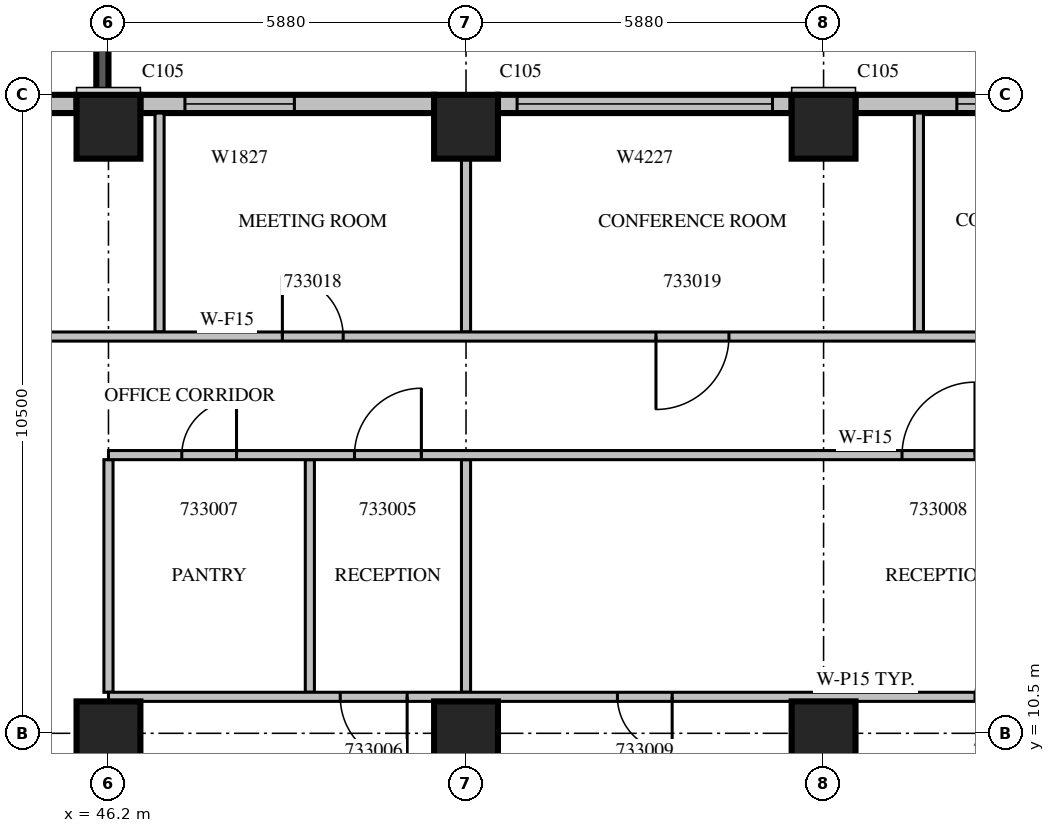
"""IFC4 building model, lengths in metres.
Left out: names, types, materials, properties, quantities, classifications, styles, units other than length and angle.
Written with IfcOpenShell. Run it as: python <this file> out.ifc"""

import sys

from ifc_helpers import new_model, si_unit, direction, frame, frame_2d, origin, origin_2d, place, context, subcontext, project, spatial, rectangle, extrude, source, transform, mapped, element, fill, save


model = new_model("IFC4")
c1 = context("Model", 3, precision=1e-05, world=origin(), true_north=direction((0.0, 1.0)))
c2 = subcontext(c1, "Body", "Model", "MODEL_VIEW")
j1 = project(units=[si_unit("LENGTHUNIT", "METRE"), si_unit("PLANEANGLEUNIT", "RADIAN")], contexts=[c1])
p1 = place(None, origin())
s1 = spatial("IfcSite", under=j1, at=p1, CompositionType="ELEMENT")
p2 = place(p1, origin())
s2 = spatial("IfcBuilding", under=s1, at=p2, CompositionType="ELEMENT")
p3 = place(p2, frame((0.0, 0.0, 149.7)))
s3 = spatial("IfcBuildingStorey", under=s2, at=p3, CompositionType="ELEMENT", Elevation=149.7)
m1 = source(origin(), c2, "Body", "SweptSolid", [
    extrude(rectangle(XDim=1.05, YDim=1.05, at=origin_2d()), origin(), (0.0, 0.0, 1.0), 4.2),
])
for number, where, z_axis, x_axis in (
    (1, (46.2, 10.5, 0.0), (0.0, 0.0, 1.0), (1.0, 0.0, 0.0)),
    (2, (52.08, 10.5, 0.0), (0.0, 0.0, 1.0), (1.0, 0.0, 0.0)),
    (3, (57.96, 10.5, 0.0), (0.0, 0.0, 1.0), (1.0, 0.0, 0.0)),
    (4, (46.2, 20.475, 0.0), (0.0, 0.0, 1.0), (1.0, 0.0, 0.0)),
    (5, (52.08, 20.475, 0.0), (0.0, 0.0, 1.0), (1.0, 0.0, 0.0)),
    (6, (57.96, 20.475, 0.0), (0.0, 0.0, 1.0), (1.0, 0.0, 0.0)),
):
    element("IfcColumn", number, at=place(p3, frame(where, z_axis=z_axis, x_axis=x_axis)), inside=s3, PredefinedType="COLUMN", context=c2, shape_type="MappedRepresentation", body=[
        mapped(m1, transform((0.0, 0.0, 0.0), scale=1.0)),
    ])
m2 = source(origin(), c2, "Body", "SweptSolid", [
    extrude(rectangle(XDim=4.83, YDim=0.3, at=frame_2d((2.415, 0.0))), origin(), (0.0, 0.0, 1.0), 3.8),
])
p4 = place(p3, frame((63.315, 20.85, 0.0), z_axis=(0.0, 0.0, 1.0), x_axis=(-1.0, 0.0, 0.0)))
e7 = element("IfcWall", 7, at=p4, inside=s3, PredefinedType="STANDARD", context=c2, shape_type="MappedRepresentation", body=[
    mapped(m2, transform((0.0, 0.0, 0.0), scale=1.0)),
])
m3 = source(origin(), c2, "Body", "SweptSolid", [
    extrude(rectangle(XDim=1.8, YDim=2.7, at=frame_2d((0.9, 1.35))), frame((0.0, 0.16, 0.0), z_axis=(0.0, -1.0, 0.0), x_axis=(1.0, 0.0, 0.0)), (0.0, 0.0, 1.0), 0.32),
])
p5 = place(p4, frame((1.363, 0.0, 0.6)))
e8 = element("IfcOpeningElement", 8, at=p5, cuts=e7, PredefinedType="OPENING", context=c2, shape_type="MappedRepresentation", body=[
    mapped(m3, transform((0.0, 0.0, 0.0), scale=1.0)),
])
p6 = place(p3, frame((57.435, 20.85, 0.0), z_axis=(0.0, 0.0, 1.0), x_axis=(-1.0, 0.0, 0.0)))
e9 = element("IfcWall", 9, at=p6, inside=s3, PredefinedType="STANDARD", context=c2, shape_type="MappedRepresentation", body=[
    mapped(m2, transform((0.0, 0.0, 0.0), scale=1.0)),
])
m4 = source(origin(), c2, "Body", "SweptSolid", [
    extrude(rectangle(XDim=4.2, YDim=2.7, at=frame_2d((2.1, 1.35))), frame((0.0, 0.16, 0.0), z_axis=(0.0, -1.0, 0.0), x_axis=(1.0, 0.0, 0.0)), (0.0, 0.0, 1.0), 0.32),
])
p7 = place(p6, frame((0.315, 0.0, 0.6)))
e10 = element("IfcOpeningElement", 10, at=p7, cuts=e9, PredefinedType="OPENING", context=c2, shape_type="MappedRepresentation", body=[
    mapped(m4, transform((0.0, 0.0, 0.0), scale=1.0)),
])
p8 = place(p3, frame((51.555, 20.85, 0.0), z_axis=(0.0, 0.0, 1.0), x_axis=(-1.0, 0.0, 0.0)))
e11 = element("IfcWall", 11, at=p8, inside=s3, PredefinedType="STANDARD", context=c2, shape_type="MappedRepresentation", body=[
    mapped(m2, transform((0.0, 0.0, 0.0), scale=1.0)),
])
p9 = place(p8, frame((2.297, 0.0, 0.6)))
e12 = element("IfcOpeningElement", 12, at=p9, cuts=e11, PredefinedType="OPENING", context=c2, shape_type="MappedRepresentation", body=[
    mapped(m3, transform((0.0, 0.0, 0.0), scale=1.0)),
])
m5 = source(origin(), c2, "Body", "SweptSolid", [
    extrude(rectangle(XDim=7.35, YDim=0.3, at=frame_2d((3.675, 0.0))), origin(), (0.0, 0.0, 1.0), 3.8),
])
p10 = place(p3, frame((45.675, 20.85, 0.0), z_axis=(0.0, 0.0, 1.0), x_axis=(-1.0, 0.0, 0.0)))
e13 = element("IfcWall", 13, at=p10, inside=s3, PredefinedType="STANDARD", context=c2, shape_type="MappedRepresentation", body=[
    mapped(m5, transform((0.0, 0.0, 0.0), scale=1.0)),
])
m6 = source(origin(), c2, "Body", "SweptSolid", [
    extrude(rectangle(XDim=1.0, YDim=2.1, at=frame_2d((0.5, 1.05))), frame((0.0, 0.16, 0.0), z_axis=(0.0, -1.0, 0.0), x_axis=(1.0, 0.0, 0.0)), (0.0, 0.0, 1.0), 0.32),
])
p11 = place(p10, frame((1.075, 0.0, 0.0)))
e14 = element("IfcOpeningElement", 14, at=p11, cuts=e13, PredefinedType="OPENING", context=c2, shape_type="MappedRepresentation", body=[
    mapped(m6, transform((0.0, 0.0, 0.0), scale=1.0)),
])
m7 = source(origin(), c2, "Body", "SweptSolid", [
    extrude(rectangle(XDim=3.9, YDim=0.2, at=frame_2d((1.95, 0.0))), origin(), (0.0, 0.0, 1.0), 3.79),
])
p12 = place(p3, frame((46.1, 21.0, 0.0), z_axis=(0.0, 0.0, 1.0), x_axis=(0.0, 1.0, 0.0)))
e15 = element("IfcWall", 15, at=p12, inside=s3, PredefinedType="SOLIDWALL", context=c2, shape_type="MappedRepresentation", body=[
    mapped(m7, transform((0.0, 0.0, 0.0), scale=1.0)),
])
m8 = source(origin(), c2, "Body", "SweptSolid", [
    extrude(rectangle(XDim=2.4, YDim=2.7, at=frame_2d((1.2, 1.35))), frame((0.0, 0.11, 0.0), z_axis=(0.0, -1.0, 0.0), x_axis=(1.0, 0.0, 0.0)), (0.0, 0.0, 1.0), 0.22),
])
p13 = place(p12, frame((0.75, 0.0, 0.6)))
e16 = element("IfcOpeningElement", 16, at=p13, cuts=e15, PredefinedType="OPENING", context=c2, shape_type="MappedRepresentation", body=[
    mapped(m8, transform((0.0, 0.0, 0.0), scale=1.0)),
])
m9 = source(origin(), c2, "Body", "SweptSolid", [
    extrude(rectangle(XDim=3.825, YDim=0.15, at=frame_2d((1.913, 0.0))), origin(), (0.0, 0.0, 1.0), 3.8),
])
for number, where, z_axis, x_axis in (
    (17, (49.512, 11.175, 0.0), (0.0, 0.0, 1.0), (0.0, 1.0, 0.0)),
    (18, (46.2, 11.175, 0.0), (0.0, 0.0, 1.0), (0.0, 1.0, 0.0)),
    (19, (52.08, 11.175, 0.0), (0.0, 0.0, 1.0), (0.0, 1.0, 0.0)),
):
    element("IfcWall", number, at=place(p3, frame(where, z_axis=z_axis, x_axis=x_axis)), inside=s3, PredefinedType="PARTITIONING", context=c2, shape_type="MappedRepresentation", body=[
        mapped(m9, transform((0.0, 0.0, 0.0), scale=1.0)),
    ])
m10 = source(origin(), c2, "Body", "SweptSolid", [
    extrude(rectangle(XDim=24.9, YDim=0.15, at=frame_2d((12.45, 0.0))), origin(), (0.0, 0.0, 1.0), 3.8),
])
p14 = place(p3, frame((71.1, 11.1, 0.0), z_axis=(0.0, 0.0, 1.0), x_axis=(-1.0, 0.0, 0.0)))
e20 = element("IfcWall", 20, at=p14, inside=s3, PredefinedType="PARTITIONING", context=c2, shape_type="MappedRepresentation", body=[
    mapped(m10, transform((0.0, 0.0, 0.0), scale=1.0)),
])
m11 = source(origin(), c2, "Body", "SweptSolid", [
    extrude(rectangle(XDim=1.1, YDim=2.1, at=frame_2d((0.55, 1.05))), frame((0.0, 0.085, 0.0), z_axis=(0.0, -1.0, 0.0), x_axis=(1.0, 0.0, 0.0)), (0.0, 0.0, 1.0), 0.17),
])
p15 = place(p14, frame((19.988, 0.0, 0.0)))
e21 = element("IfcOpeningElement", 21, at=p15, cuts=e20, PredefinedType="OPENING", context=c2, shape_type="MappedRepresentation", body=[
    mapped(m11, transform((0.0, 0.0, 0.0), scale=1.0)),
])
m12 = source(origin(), c2, "Body", "SweptSolid", [
    extrude(rectangle(XDim=0.9, YDim=2.1, at=frame_2d((0.45, 1.05))), frame((0.0, 0.085, 0.0), z_axis=(0.0, -1.0, 0.0), x_axis=(1.0, 0.0, 0.0)), (0.0, 0.0, 1.0), 0.17),
])
p16 = place(p14, frame((15.63, 0.0, 0.0)))
e22 = element("IfcOpeningElement", 22, at=p16, cuts=e20, PredefinedType="OPENING", context=c2, shape_type="MappedRepresentation", body=[
    mapped(m12, transform((0.0, 0.0, 0.0), scale=1.0)),
])
p17 = place(p14, frame((9.75, 0.0, 0.0)))
e23 = element("IfcOpeningElement", 23, at=p17, cuts=e20, PredefinedType="OPENING", context=c2, shape_type="MappedRepresentation", body=[
    mapped(m12, transform((0.0, 0.0, 0.0), scale=1.0)),
])
p18 = place(p14, frame((2.205, 0.0, 0.0)))
e24 = element("IfcOpeningElement", 24, at=p18, cuts=e20, PredefinedType="OPENING", context=c2, shape_type="MappedRepresentation", body=[
    mapped(m12, transform((0.0, 0.0, 0.0), scale=1.0)),
])
m13 = source(origin(), c2, "Body", "SweptSolid", [
    extrude(rectangle(XDim=3.6, YDim=0.15, at=frame_2d((1.8, 0.0))), origin(), (0.0, 0.0, 1.0), 3.8),
])
for number, where, z_axis, x_axis in (
    (25, (47.04, 20.7, 0.0), (0.0, 0.0, 1.0), (0.0, -1.0, 0.0)),
    (26, (59.528, 20.7, 0.0), (0.0, 0.0, 1.0), (0.0, -1.0, 0.0)),
):
    element("IfcWall", number, at=place(p3, frame(where, z_axis=z_axis, x_axis=x_axis)), inside=s3, PredefinedType="PARTITIONING", context=c2, shape_type="MappedRepresentation", body=[
        mapped(m13, transform((0.0, 0.0, 0.0), scale=1.0)),
    ])
m14 = source(origin(), c2, "Body", "SweptSolid", [
    extrude(rectangle(XDim=2.851, YDim=0.15, at=frame_2d((1.425, 0.0))), origin(), (0.0, 0.0, 1.0), 3.8),
])
p19 = place(p3, frame((52.08, 17.1, 0.0), z_axis=(0.0, 0.0, 1.0), x_axis=(0.0, 1.0, 0.0)))
e27 = element("IfcWall", 27, at=p19, inside=s3, PredefinedType="PARTITIONING", context=c2, shape_type="MappedRepresentation", body=[
    mapped(m14, transform((0.0, 0.0, 0.0), scale=1.0)),
])
p20 = place(p3, frame((71.1, 15.075, 0.0), z_axis=(0.0, 0.0, 1.0), x_axis=(-1.0, 0.0, 0.0)))
e28 = element("IfcWall", 28, at=p20, inside=s3, PredefinedType="PARTITIONING", context=c2, shape_type="MappedRepresentation", body=[
    mapped(m10, transform((0.0, 0.0, 0.0), scale=1.0)),
])
p21 = place(p20, frame((19.754, 0.0, 0.0)))
e29 = element("IfcOpeningElement", 29, at=p21, cuts=e28, PredefinedType="OPENING", context=c2, shape_type="MappedRepresentation", body=[
    mapped(m11, transform((0.0, 0.0, 0.0), scale=1.0)),
])
p22 = place(p20, frame((22.794, 0.0, 0.0)))
e30 = element("IfcOpeningElement", 30, at=p22, cuts=e28, PredefinedType="OPENING", context=c2, shape_type="MappedRepresentation", body=[
    mapped(m12, transform((0.0, 0.0, 0.0), scale=1.0)),
])
m15 = source(origin(), c2, "Body", "SweptSolid", [
    extrude(rectangle(XDim=1.2, YDim=2.1, at=frame_2d((0.6, 1.05))), frame((0.0, 0.085, 0.0), z_axis=(0.0, -1.0, 0.0), x_axis=(1.0, 0.0, 0.0)), (0.0, 0.0, 1.0), 0.17),
])
p23 = place(p20, frame((10.65, 0.0, 0.0)))
e31 = element("IfcOpeningElement", 31, at=p23, cuts=e28, PredefinedType="OPENING", context=c2, shape_type="MappedRepresentation", body=[
    mapped(m15, transform((0.0, 0.0, 0.0), scale=1.0)),
])
p24 = place(p20, frame((1.103, 0.0, 0.0)))
e32 = element("IfcOpeningElement", 32, at=p24, cuts=e28, PredefinedType="OPENING", context=c2, shape_type="MappedRepresentation", body=[
    mapped(m15, transform((0.0, 0.0, 0.0), scale=1.0)),
])
m16 = source(origin(), c2, "Body", "SweptSolid", [
    extrude(rectangle(XDim=37.5, YDim=0.15, at=frame_2d((18.75, 0.0))), origin(), (0.0, 0.0, 1.0), 3.8),
])
p25 = place(p3, frame((29.4, 17.025, 0.0), z_axis=(0.0, 0.0, 1.0), x_axis=(1.0, 0.0, 0.0)))
e33 = element("IfcWall", 33, at=p25, inside=s3, PredefinedType="PARTITIONING", context=c2, shape_type="MappedRepresentation", body=[
    mapped(m16, transform((0.0, 0.0, 0.0), scale=1.0)),
])
m17 = source(origin(), c2, "Body", "SweptSolid", [
    extrude(rectangle(XDim=1.0, YDim=2.1, at=frame_2d((0.5, 1.05))), frame((0.0, 0.085, 0.0), z_axis=(0.0, -1.0, 0.0), x_axis=(1.0, 0.0, 0.0)), (0.0, 0.0, 1.0), 0.17),
])
p26 = place(p25, frame((1.357, 0.0, 0.0)))
e34 = element("IfcOpeningElement", 34, at=p26, cuts=e33, PredefinedType="OPENING", context=c2, shape_type="MappedRepresentation", body=[
    mapped(m17, transform((0.0, 0.0, 0.0), scale=1.0)),
])
p27 = place(p25, frame((4.669, 0.0, 0.0)))
e35 = element("IfcOpeningElement", 35, at=p27, cuts=e33, PredefinedType="OPENING", context=c2, shape_type="MappedRepresentation", body=[
    mapped(m17, transform((0.0, 0.0, 0.0), scale=1.0)),
])
p28 = place(p25, frame((7.012, 0.0, 0.0)))
e36 = element("IfcOpeningElement", 36, at=p28, cuts=e33, PredefinedType="OPENING", context=c2, shape_type="MappedRepresentation", body=[
    mapped(m17, transform((0.0, 0.0, 0.0), scale=1.0)),
])
p29 = place(p25, frame((10.05, 0.0, 0.0)))
e37 = element("IfcOpeningElement", 37, at=p29, cuts=e33, PredefinedType="OPENING", context=c2, shape_type="MappedRepresentation", body=[
    mapped(m12, transform((0.0, 0.0, 0.0), scale=1.0)),
])
p30 = place(p25, frame((14.62, 0.0, 0.0)))
e38 = element("IfcOpeningElement", 38, at=p30, cuts=e33, PredefinedType="OPENING", context=c2, shape_type="MappedRepresentation", body=[
    mapped(m17, transform((0.0, 0.0, 0.0), scale=1.0)),
])
p31 = place(p25, frame((19.66, 0.0, 0.0)))
e39 = element("IfcOpeningElement", 39, at=p31, cuts=e33, PredefinedType="OPENING", context=c2, shape_type="MappedRepresentation", body=[
    mapped(m17, transform((0.0, 0.0, 0.0), scale=1.0)),
])
p32 = place(p25, frame((25.804, 0.0, 0.0)))
e40 = element("IfcOpeningElement", 40, at=p32, cuts=e33, PredefinedType="OPENING", context=c2, shape_type="MappedRepresentation", body=[
    mapped(m15, transform((0.0, 0.0, 0.0), scale=1.0)),
])
p33 = place(p25, frame((33.251, 0.0, 0.0)))
e41 = element("IfcOpeningElement", 41, at=p33, cuts=e33, PredefinedType="OPENING", context=c2, shape_type="MappedRepresentation", body=[
    mapped(m15, transform((0.0, 0.0, 0.0), scale=1.0)),
])
m18 = source(origin(), c2, "Body", "SweptSolid", [
    extrude(rectangle(XDim=1.8, YDim=2.7, at=frame_2d((0.9, 1.35))), frame((0.0, 0.03, 0.0), z_axis=(0.0, -1.0, 0.0), x_axis=(1.0, 0.0, 0.0)), (0.0, 0.0, 1.0), 0.06),
])
p34 = place(p5, origin())
e42 = element("IfcWindow", 42, at=p34, inside=s3, PartitioningType="SINGLE_PANEL", PredefinedType="WINDOW", context=c2, shape_type="MappedRepresentation", body=[
    mapped(m18, transform((0.0, 0.0, 0.0), scale=1.0)),
])
fill(e8, e42)
p35 = place(p9, origin())
e43 = element("IfcWindow", 43, at=p35, inside=s3, PartitioningType="SINGLE_PANEL", PredefinedType="WINDOW", context=c2, shape_type="MappedRepresentation", body=[
    mapped(m18, transform((0.0, 0.0, 0.0), scale=1.0)),
])
fill(e12, e43)
m19 = source(origin(), c2, "Body", "SweptSolid", [
    extrude(rectangle(XDim=4.2, YDim=2.7, at=frame_2d((2.1, 1.35))), frame((0.0, 0.03, 0.0), z_axis=(0.0, -1.0, 0.0), x_axis=(1.0, 0.0, 0.0)), (0.0, 0.0, 1.0), 0.06),
])
p36 = place(p7, origin())
e44 = element("IfcWindow", 44, at=p36, inside=s3, PartitioningType="SINGLE_PANEL", PredefinedType="WINDOW", context=c2, shape_type="MappedRepresentation", body=[
    mapped(m19, transform((0.0, 0.0, 0.0), scale=1.0)),
])
fill(e10, e44)
m20 = source(origin(), c2, "Body", "SweptSolid", [
    extrude(rectangle(XDim=1.1, YDim=2.1, at=frame_2d((0.55, 1.05))), frame((0.0, 0.025, 0.0), z_axis=(0.0, -1.0, 0.0), x_axis=(1.0, 0.0, 0.0)), (0.0, 0.0, 1.0), 0.05),
])
p37 = place(p21, origin())
e45 = element("IfcDoor", 45, at=p37, inside=s3, OperationType="SINGLE_SWING_RIGHT", PredefinedType="DOOR", context=c2, shape_type="MappedRepresentation", body=[
    mapped(m20, transform((0.0, 0.0, 0.0), scale=1.0)),
])
fill(e29, e45)
p38 = place(p15, origin())
e46 = element("IfcDoor", 46, at=p38, inside=s3, OperationType="SINGLE_SWING_LEFT", PredefinedType="DOOR", context=c2, shape_type="MappedRepresentation", body=[
    mapped(m20, transform((0.0, 0.0, 0.0), scale=1.0)),
])
fill(e21, e46)
m21 = source(origin(), c2, "Body", "SweptSolid", [
    extrude(rectangle(XDim=0.9, YDim=2.1, at=frame_2d((0.45, 1.05))), frame((0.0, 0.025, 0.0), z_axis=(0.0, -1.0, 0.0), x_axis=(1.0, 0.0, 0.0)), (0.0, 0.0, 1.0), 0.05),
])
p39 = place(p22, origin())
e47 = element("IfcDoor", 47, at=p39, inside=s3, OperationType="SINGLE_SWING_RIGHT", PredefinedType="DOOR", context=c2, shape_type="MappedRepresentation", body=[
    mapped(m21, transform((0.0, 0.0, 0.0), scale=1.0)),
])
fill(e30, e47)
m22 = source(origin(), c2, "Body", "SweptSolid", [
    extrude(rectangle(XDim=1.2, YDim=2.1, at=frame_2d((0.6, 1.05))), frame((0.0, 0.025, 0.0), z_axis=(0.0, -1.0, 0.0), x_axis=(1.0, 0.0, 0.0)), (0.0, 0.0, 1.0), 0.05),
])
p40 = place(p23, origin())
e48 = element("IfcDoor", 48, at=p40, inside=s3, OperationType="SINGLE_SWING_RIGHT", PredefinedType="DOOR", context=c2, shape_type="MappedRepresentation", body=[
    mapped(m22, transform((0.0, 0.0, 0.0), scale=1.0)),
])
fill(e31, e48)
p41 = place(p16, origin())
e49 = element("IfcDoor", 49, at=p41, inside=s3, OperationType="SINGLE_SWING_LEFT", PredefinedType="DOOR", context=c2, shape_type="MappedRepresentation", body=[
    mapped(m21, transform((0.0, 0.0, 0.0), scale=1.0)),
])
fill(e22, e49)
p42 = place(p17, origin())
e50 = element("IfcDoor", 50, at=p42, inside=s3, OperationType="SINGLE_SWING_RIGHT", PredefinedType="DOOR", context=c2, shape_type="MappedRepresentation", body=[
    mapped(m21, transform((0.0, 0.0, 0.0), scale=1.0)),
])
fill(e23, e50)
m23 = source(origin(), c2, "Body", "SweptSolid", [
    extrude(rectangle(XDim=1.0, YDim=2.1, at=frame_2d((0.5, 1.05))), frame((0.0, 0.025, 0.0), z_axis=(0.0, -1.0, 0.0), x_axis=(1.0, 0.0, 0.0)), (0.0, 0.0, 1.0), 0.05),
])
p43 = place(p31, origin())
e51 = element("IfcDoor", 51, at=p43, inside=s3, OperationType="SINGLE_SWING_LEFT", PredefinedType="DOOR", context=c2, shape_type="MappedRepresentation", body=[
    mapped(m23, transform((0.0, 0.0, 0.0), scale=1.0)),
])
fill(e39, e51)
p44 = place(p32, origin())
e52 = element("IfcDoor", 52, at=p44, inside=s3, OperationType="SINGLE_SWING_RIGHT", PredefinedType="DOOR", context=c2, shape_type="MappedRepresentation", body=[
    mapped(m22, transform((0.0, 0.0, 0.0), scale=1.0)),
])
fill(e40, e52)
save(model, sys.argv[1])
